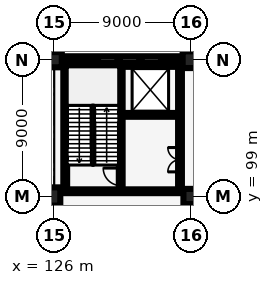
"""IFC4 building model, lengths in metres.
Left out: names, types, materials, properties, quantities, classifications, styles, units other than length and angle.
Written with IfcOpenShell. Run it as: python <this file> out.ifc"""

import sys

from ifc_helpers import new_model, si_unit, direction, frame, frame_2d, origin, origin_2d, place, context, subcontext, project, spatial, rectangle, extrude, element, fill, save


model = new_model("IFC4")
c1 = context("Model", 3, precision=1e-05, world=origin(), true_north=direction((0.0, 1.0)))
c2 = subcontext(c1, "Body", "Model", "MODEL_VIEW")
j1 = project(units=[si_unit("LENGTHUNIT", "METRE"), si_unit("PLANEANGLEUNIT", "RADIAN")], contexts=[c1])
p1 = place(None, origin())
s1 = spatial("IfcSite", under=j1, at=p1, CompositionType="ELEMENT")
p2 = place(p1, origin())
s2 = spatial("IfcBuilding", under=s1, at=p2, CompositionType="ELEMENT")
p3 = place(p2, frame((0.0, 0.0, -5.0)))
s3 = spatial("IfcBuildingStorey", under=s2, at=p3, CompositionType="ELEMENT", Elevation=-5.0)
p4 = place(p3, frame((126.0, 99.0, 0.0), z_axis=(0.0, 0.0, 1.0), x_axis=(1.0, 0.0, 0.0)))
e1 = element("IfcColumn", 1, at=p4, inside=s3, PredefinedType="COLUMN", context=c2, shape_type="SweptSolid", body=[
    extrude(rectangle(XDim=0.8, YDim=1.2, at=origin_2d()), origin(), (0.0, 0.0, 1.0), 5.0),
])
for number, where, z_axis, x_axis in (
    (2, (126.0, 108.0, 0.0), (0.0, 0.0, 1.0), (1.0, 0.0, 0.0)),
    (3, (135.0, 99.0, 0.0), (0.0, 0.0, 1.0), (1.0, 0.0, 0.0)),
):
    element("IfcColumn", number, at=place(p3, frame(where, z_axis=z_axis, x_axis=x_axis)), inside=s3, PredefinedType="COLUMN", context=c2, shape_type="SweptSolid", body=[
        extrude(rectangle(XDim=1.0, YDim=1.0, at=origin_2d()), origin(), (0.0, 0.0, 1.0), 5.0),
    ])
p5 = place(p3, frame((135.0, 108.0, 0.0), z_axis=(0.0, 0.0, 1.0), x_axis=(1.0, 0.0, 0.0)))
e4 = element("IfcColumn", 4, at=p5, inside=s3, PredefinedType="COLUMN", context=c2, shape_type="SweptSolid", body=[
    extrude(rectangle(XDim=1.1, YDim=1.1, at=origin_2d()), origin(), (0.0, 0.0, 1.0), 5.0),
])
p6 = place(p3, frame((126.495, 108.0, 0.0), z_axis=(0.0, 0.0, 1.0), x_axis=(1.0, 0.0, 0.0)))
e5 = element("IfcWall", 5, at=p6, inside=s3, PredefinedType="SHEAR", context=c2, shape_type="SweptSolid", body=[
    extrude(rectangle(XDim=9.305, YDim=0.45, at=frame_2d((4.652, 0.0))), origin(), (0.0, 0.0, 1.0), 3.95),
])
p7 = place(p3, frame((126.0, 108.495, 0.0), z_axis=(0.0, 0.0, 1.0), x_axis=(0.0, 1.0, 0.0)))
e6 = element("IfcWall", 6, at=p7, inside=s3, PredefinedType="SHEAR", context=c2, shape_type="SweptSolid", body=[
    extrude(rectangle(XDim=25.91, YDim=0.4, at=frame_2d((12.955, 0.0))), origin(), (0.0, 0.0, 1.0), 3.95),
])
p8 = place(p3, frame((126.725, 99.47, 0.0), z_axis=(0.0, 0.0, 1.0), x_axis=(0.0, 1.0, 0.0)))
e7 = element("IfcWall", 7, at=p8, inside=s3, PredefinedType="SHEAR", context=c2, shape_type="SweptSolid", body=[
    extrude(rectangle(XDim=8.06, YDim=0.25, at=frame_2d((4.03, 0.0))), origin(), (0.0, 0.0, 1.0), 4.58),
])
p9 = place(p3, frame((134.275, 99.47, 0.0), z_axis=(0.0, 0.0, 1.0), x_axis=(0.0, 1.0, 0.0)))
e8 = element("IfcWall", 8, at=p9, inside=s3, PredefinedType="SHEAR", context=c2, shape_type="SweptSolid", body=[
    extrude(rectangle(XDim=8.06, YDim=0.25, at=frame_2d((4.03, 0.0))), origin(), (0.0, 0.0, 1.0), 4.58),
])
p10 = place(p9, frame((1.15, 0.0, 0.0)))
e9 = element("IfcOpeningElement", 9, at=p10, cuts=e8, PredefinedType="OPENING", context=c2, shape_type="SweptSolid", body=[
    extrude(rectangle(XDim=1.6, YDim=2.2, at=frame_2d((0.8, 1.1))), frame((0.0, 0.135, 0.0), z_axis=(0.0, -1.0, 0.0), x_axis=(1.0, 0.0, 0.0)), (0.0, 0.0, 1.0), 0.27),
])
for number, where, z_axis, x_axis in (
    (10, (126.6, 99.345, 0.0), (0.0, 0.0, 1.0), (1.0, 0.0, 0.0)),
    (11, (126.6, 107.655, 0.0), (0.0, 0.0, 1.0), (1.0, 0.0, 0.0)),
):
    element("IfcWall", number, at=place(p3, frame(where, z_axis=z_axis, x_axis=x_axis)), inside=s3, PredefinedType="SHEAR", context=c2, shape_type="SweptSolid", body=[
        extrude(rectangle(XDim=7.8, YDim=0.25, at=frame_2d((3.9, 0.0))), origin(), (0.0, 0.0, 1.0), 4.58),
    ])
p11 = place(p3, frame((130.375, 99.47, 0.0), z_axis=(0.0, 0.0, 1.0), x_axis=(0.0, 1.0, 0.0)))
e12 = element("IfcWall", 12, at=p11, inside=s3, PredefinedType="SHEAR", context=c2, shape_type="SweptSolid", body=[
    extrude(rectangle(XDim=8.06, YDim=0.25, at=frame_2d((4.03, 0.0))), origin(), (0.0, 0.0, 1.0), 4.58),
])
p12 = place(p11, frame((0.25, 0.0, 0.0)))
e13 = element("IfcOpeningElement", 13, at=p12, cuts=e12, PredefinedType="OPENING", context=c2, shape_type="SweptSolid", body=[
    extrude(rectangle(XDim=1.15, YDim=2.15, at=frame_2d((0.575, 1.075))), frame((0.0, 0.135, 0.0), z_axis=(0.0, -1.0, 0.0), x_axis=(1.0, 0.0, 0.0)), (0.0, 0.0, 1.0), 0.27),
])
p13 = place(p3, frame((130.5, 104.37, 0.0), z_axis=(0.0, 0.0, 1.0), x_axis=(1.0, 0.0, 0.0)))
e14 = element("IfcWall", 14, at=p13, inside=s3, PredefinedType="SHEAR", context=c2, shape_type="SweptSolid", body=[
    extrude(rectangle(XDim=3.65, YDim=0.25, at=frame_2d((1.825, 0.0))), origin(), (0.0, 0.0, 1.0), 4.58),
])
p14 = place(p13, frame((0.5, 0.0, 0.0)))
e15 = element("IfcOpeningElement", 15, at=p14, cuts=e14, PredefinedType="OPENING", context=c2, shape_type="SweptSolid", body=[
    extrude(rectangle(XDim=2.2, YDim=2.4, at=frame_2d((1.1, 1.2))), frame((0.0, 0.135, 0.0), z_axis=(0.0, -1.0, 0.0), x_axis=(1.0, 0.0, 0.0)), (0.0, 0.0, 1.0), 0.27),
])
p15 = place(p12, origin())
e16 = element("IfcDoor", 16, at=p15, inside=s3, OperationType="SINGLE_SWING_RIGHT", PredefinedType="DOOR", context=c2, shape_type="SweptSolid", body=[
    extrude(rectangle(XDim=1.15, YDim=2.15, at=frame_2d((0.575, 1.075))), frame((0.0, 0.025, 0.0), z_axis=(0.0, -1.0, 0.0), x_axis=(1.0, 0.0, 0.0)), (0.0, 0.0, 1.0), 0.05),
])
fill(e13, e16)
p16 = place(p14, origin())
e17 = element("IfcDoor", 17, at=p16, inside=s3, OperationType="DOUBLE_DOOR_SLIDING", PredefinedType="DOOR", context=c2, shape_type="SweptSolid", body=[
    extrude(rectangle(XDim=2.2, YDim=2.4, at=frame_2d((1.1, 1.2))), frame((0.0, 0.025, 0.0), z_axis=(0.0, -1.0, 0.0), x_axis=(1.0, 0.0, 0.0)), (0.0, 0.0, 1.0), 0.05),
])
fill(e15, e17)
p17 = place(p10, origin())
e18 = element("IfcDoor", 18, at=p17, inside=s3, OperationType="DOUBLE_DOOR_SINGLE_SWING", PredefinedType="DOOR", context=c2, shape_type="SweptSolid", body=[
    extrude(rectangle(XDim=1.6, YDim=2.2, at=frame_2d((0.8, 1.1))), frame((0.0, 0.025, 0.0), z_axis=(0.0, -1.0, 0.0), x_axis=(1.0, 0.0, 0.0)), (0.0, 0.0, 1.0), 0.05),
])
fill(e9, e18)
save(model, sys.argv[1])
